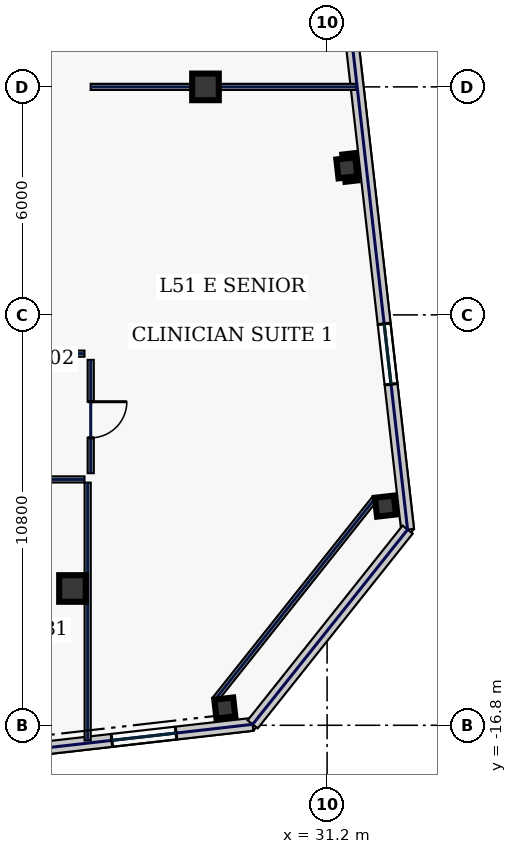
"""IFC4 building model, lengths in metres.
Left out: names, types, materials, properties, quantities, classifications, styles, units other than length and angle.
Written with IfcOpenShell. Run it as: python <this file> out.ifc"""

import sys

from ifc_helpers import new_model, si_unit, direction, frame, frame_2d, origin, origin_2d, place, context, subcontext, project, spatial, rectangle, hollow_rectangle, extrude, element, fill, save


model = new_model("IFC4")
c1 = context("Model", 3, precision=1e-05, world=origin(), true_north=direction((0.0, 1.0)))
c2 = subcontext(c1, "Body", "Model", "MODEL_VIEW")
j1 = project(units=[si_unit("LENGTHUNIT", "METRE"), si_unit("PLANEANGLEUNIT", "RADIAN")], contexts=[c1])
p1 = place(None, origin())
s1 = spatial("IfcSite", under=j1, at=p1, CompositionType="ELEMENT")
p2 = place(p1, origin())
s2 = spatial("IfcBuilding", under=s1, at=p2, CompositionType="ELEMENT")
p3 = place(p2, frame((0.0, 0.0, 222.2)))
s3 = spatial("IfcBuildingStorey", under=s2, at=p3, CompositionType="ELEMENT", Elevation=222.2)
for number, where, z_axis, x_axis in (
    (1, (24.5, -13.2, 0.0), (0.0, 0.0, 1.0), (1.0, 0.0, 0.0)),
    (2, (28.0, 0.0, 0.0), (0.0, 0.0, 1.0), (1.0, 0.0, 0.0)),
):
    element("IfcColumn", number, at=place(p3, frame(where, z_axis=z_axis, x_axis=x_axis)), inside=s3, PredefinedType="COLUMN", context=c2, shape_type="SweptSolid", body=[
        extrude(hollow_rectangle(XDim=0.7, YDim=0.7, WallThickness=0.032, at=origin_2d()), origin(), (0.0, 0.0, 1.0), 3.74),
    ])
for number, where, z_axis, x_axis in (
    (3, (28.509, -16.345, 0.0), (0.0, 0.0, 1.0), (0.994, 0.113, 0.0)),
    (4, (32.734, -11.033, 0.0), (0.0, 0.0, 1.0), (0.994, 0.113, 0.0)),
    (5, (31.72, -2.131, 0.0), (0.0, 0.0, 1.0), (0.994, 0.113, 0.0)),
):
    element("IfcColumn", number, at=place(p3, frame(where, z_axis=z_axis, x_axis=x_axis)), inside=s3, PredefinedType="COLUMN", context=c2, shape_type="SweptSolid", body=[
        extrude(hollow_rectangle(XDim=0.5, YDim=0.5, WallThickness=0.025, at=origin_2d()), origin(), (0.0, 0.0, 1.0), 3.74),
    ])
p4 = place(p3, frame((10.71, -18.886, 0.0), z_axis=(0.0, 0.0, 1.0), x_axis=(0.993572271362, 0.113199565282, 0.0)))
e6 = element("IfcWall", 6, at=p4, inside=s3, PredefinedType="STANDARD", context=c2, shape_type="SweptSolid", body=[
    extrude(rectangle(XDim=18.651, YDim=0.34, at=frame_2d((9.326, 0.0))), origin(), (0.0, 0.0, 1.0), 3.74),
])
p5 = place(p4, frame((3.024, 0.0, 0.88)))
e7 = element("IfcOpeningElement", 7, at=p5, cuts=e6, PredefinedType="OPENING", context=c2, shape_type="SweptSolid", body=[
    extrude(rectangle(XDim=1.7, YDim=1.95, at=frame_2d((0.85, 0.975))), frame((0.0, 0.18, 0.0), z_axis=(0.0, -1.0, 0.0), x_axis=(1.0, 0.0, 0.0)), (0.0, 0.0, 1.0), 0.36),
])
p6 = place(p4, frame((6.773, 0.0, 0.88)))
e8 = element("IfcOpeningElement", 8, at=p6, cuts=e6, PredefinedType="OPENING", context=c2, shape_type="SweptSolid", body=[
    extrude(rectangle(XDim=1.7, YDim=1.95, at=frame_2d((0.85, 0.975))), frame((0.0, 0.18, 0.0), z_axis=(0.0, -1.0, 0.0), x_axis=(1.0, 0.0, 0.0)), (0.0, 0.0, 1.0), 0.36),
])
p7 = place(p4, frame((11.173, 0.0, 0.88)))
e9 = element("IfcOpeningElement", 9, at=p7, cuts=e6, PredefinedType="OPENING", context=c2, shape_type="SweptSolid", body=[
    extrude(rectangle(XDim=1.7, YDim=1.95, at=frame_2d((0.85, 0.975))), frame((0.0, 0.18, 0.0), z_axis=(0.0, -1.0, 0.0), x_axis=(1.0, 0.0, 0.0)), (0.0, 0.0, 1.0), 0.36),
])
p8 = place(p4, frame((14.921, 0.0, 0.88)))
e10 = element("IfcOpeningElement", 10, at=p8, cuts=e6, PredefinedType="OPENING", context=c2, shape_type="SweptSolid", body=[
    extrude(rectangle(XDim=1.7, YDim=1.95, at=frame_2d((0.85, 0.975))), frame((0.0, 0.18, 0.0), z_axis=(0.0, -1.0, 0.0), x_axis=(1.0, 0.0, 0.0)), (0.0, 0.0, 1.0), 0.36),
])
p9 = place(p3, frame((33.318, -11.651, 0.0), z_axis=(0.0, 0.0, 1.0), x_axis=(-0.11320360501, 0.9935718111, 0.0)))
e11 = element("IfcWall", 11, at=p9, inside=s3, PredefinedType="STANDARD", context=c2, shape_type="SweptSolid", body=[
    extrude(rectangle(XDim=37.2, YDim=0.34, at=frame_2d((18.6, 0.0))), origin(), (0.0, 0.0, 1.0), 3.74),
])
p10 = place(p9, frame((3.85, 0.0, 0.58)))
e12 = element("IfcOpeningElement", 12, at=p10, cuts=e11, PredefinedType="OPENING", context=c2, shape_type="SweptSolid", body=[
    extrude(rectangle(XDim=1.6, YDim=2.3, at=frame_2d((0.8, 1.15))), frame((0.0, 0.18, 0.0), z_axis=(0.0, -1.0, 0.0), x_axis=(1.0, 0.0, 0.0)), (0.0, 0.0, 1.0), 0.36),
])
p11 = place(p9, frame((13.15, 0.0, 0.58)))
e13 = element("IfcOpeningElement", 13, at=p11, cuts=e11, PredefinedType="OPENING", context=c2, shape_type="SweptSolid", body=[
    extrude(rectangle(XDim=1.6, YDim=2.3, at=frame_2d((0.8, 1.15))), frame((0.0, 0.18, 0.0), z_axis=(0.0, -1.0, 0.0), x_axis=(1.0, 0.0, 0.0)), (0.0, 0.0, 1.0), 0.36),
])
p12 = place(p9, frame((22.45, 0.0, 0.58)))
e14 = element("IfcOpeningElement", 14, at=p12, cuts=e11, PredefinedType="OPENING", context=c2, shape_type="SweptSolid", body=[
    extrude(rectangle(XDim=1.6, YDim=2.3, at=frame_2d((0.8, 1.15))), frame((0.0, 0.18, 0.0), z_axis=(0.0, -1.0, 0.0), x_axis=(1.0, 0.0, 0.0)), (0.0, 0.0, 1.0), 0.36),
])
p13 = place(p9, frame((31.75, 0.0, 0.58)))
e15 = element("IfcOpeningElement", 15, at=p13, cuts=e11, PredefinedType="OPENING", context=c2, shape_type="SweptSolid", body=[
    extrude(rectangle(XDim=1.6, YDim=2.3, at=frame_2d((0.8, 1.15))), frame((0.0, 0.18, 0.0), z_axis=(0.0, -1.0, 0.0), x_axis=(1.0, 0.0, 0.0)), (0.0, 0.0, 1.0), 0.36),
])
p14 = place(p3, frame((29.242, -16.775, 0.0), z_axis=(0.0, 0.0, 1.0), x_axis=(0.62252823689, 0.78259733853, 0.0)))
e16 = element("IfcWall", 16, at=p14, inside=s3, PredefinedType="STANDARD", context=c2, shape_type="SweptSolid", body=[
    extrude(rectangle(XDim=6.548, YDim=0.34, at=frame_2d((3.274, 0.0))), origin(), (0.0, 0.0, 1.0), 3.74),
])
p15 = place(p3, frame((28.242, -16.134, 0.0), z_axis=(0.0, 0.0, 1.0), x_axis=(0.622521563328, 0.782602647064, 0.0)))
e17 = element("IfcWall", 17, at=p15, inside=s3, PredefinedType="PARTITIONING", context=c2, shape_type="SweptSolid", body=[
    extrude(rectangle(XDim=6.788, YDim=0.16, at=frame_2d((3.394, 0.0))), origin(), (0.0, 0.0, 1.0), 3.74),
])
p16 = place(p3, frame((10.715, -7.02, 0.0), z_axis=(0.0, 0.0, 1.0), x_axis=(1.0, 0.0, 0.0)))
e18 = element("IfcWall", 18, at=p16, inside=s3, PredefinedType="PARTITIONING", context=c2, shape_type="SweptSolid", body=[
    extrude(rectangle(XDim=14.1, YDim=0.16, at=frame_2d((7.05, 0.0))), origin(), (0.0, 0.0, 1.0), 3.74),
])
p17 = place(p3, frame((24.98, -7.185, 0.0), z_axis=(0.0, 0.0, 1.0), x_axis=(0.0, -1.0, 0.0)))
e19 = element("IfcWall", 19, at=p17, inside=s3, PredefinedType="PARTITIONING", context=c2, shape_type="SweptSolid", body=[
    extrude(rectangle(XDim=2.98, YDim=0.16, at=frame_2d((1.49, 0.0))), origin(), (0.0, 0.0, 1.0), 3.74),
])
p18 = place(p17, frame((1.1, 0.0, 0.0)))
e20 = element("IfcOpeningElement", 20, at=p18, cuts=e19, PredefinedType="OPENING", context=c2, shape_type="SweptSolid", body=[
    extrude(rectangle(XDim=0.95, YDim=2.2, at=frame_2d((0.475, 1.1))), frame((0.0, 0.09, 0.0), z_axis=(0.0, -1.0, 0.0), x_axis=(1.0, 0.0, 0.0)), (0.0, 0.0, 1.0), 0.18),
])
p19 = place(p3, frame((24.815, -10.33, 0.0), z_axis=(0.0, 0.0, 1.0), x_axis=(-1.0, 0.0, 0.0)))
e21 = element("IfcWall", 21, at=p19, inside=s3, PredefinedType="PARTITIONING", context=c2, shape_type="SweptSolid", body=[
    extrude(rectangle(XDim=49.63, YDim=0.16, at=frame_2d((24.815, 0.0))), origin(), (0.0, 0.0, 1.0), 3.74),
])
p20 = place(p19, frame((46.631, 0.0, 0.0)))
e22 = element("IfcOpeningElement", 22, at=p20, cuts=e21, PredefinedType="OPENING", context=c2, shape_type="SweptSolid", body=[
    extrude(rectangle(XDim=1.3, YDim=2.2, at=frame_2d((0.65, 1.1))), frame((0.0, 0.09, 0.0), z_axis=(0.0, -1.0, 0.0), x_axis=(1.0, 0.0, 0.0)), (0.0, 0.0, 1.0), 0.18),
])
p21 = place(p19, frame((42.13, 0.0, 0.0)))
e23 = element("IfcOpeningElement", 23, at=p21, cuts=e21, PredefinedType="OPENING", context=c2, shape_type="SweptSolid", body=[
    extrude(rectangle(XDim=0.95, YDim=2.2, at=frame_2d((0.475, 1.1))), frame((0.0, 0.09, 0.0), z_axis=(0.0, -1.0, 0.0), x_axis=(1.0, 0.0, 0.0)), (0.0, 0.0, 1.0), 0.18),
])
p22 = place(p19, frame((33.55, 0.0, 0.0)))
e24 = element("IfcOpeningElement", 24, at=p22, cuts=e21, PredefinedType="OPENING", context=c2, shape_type="SweptSolid", body=[
    extrude(rectangle(XDim=1.15, YDim=2.2, at=frame_2d((0.575, 1.1))), frame((0.0, 0.09, 0.0), z_axis=(0.0, -1.0, 0.0), x_axis=(1.0, 0.0, 0.0)), (0.0, 0.0, 1.0), 0.18),
])
p23 = place(p19, frame((25.89, 0.0, 0.0)))
e25 = element("IfcOpeningElement", 25, at=p23, cuts=e21, PredefinedType="OPENING", context=c2, shape_type="SweptSolid", body=[
    extrude(rectangle(XDim=0.95, YDim=2.2, at=frame_2d((0.475, 1.1))), frame((0.0, 0.09, 0.0), z_axis=(0.0, -1.0, 0.0), x_axis=(1.0, 0.0, 0.0)), (0.0, 0.0, 1.0), 0.18),
])
p24 = place(p19, frame((14.965, 0.0, 0.0)))
e26 = element("IfcOpeningElement", 26, at=p24, cuts=e21, PredefinedType="OPENING", context=c2, shape_type="SweptSolid", body=[
    extrude(rectangle(XDim=0.95, YDim=2.2, at=frame_2d((0.475, 1.1))), frame((0.0, 0.09, 0.0), z_axis=(0.0, -1.0, 0.0), x_axis=(1.0, 0.0, 0.0)), (0.0, 0.0, 1.0), 0.18),
])
p25 = place(p19, frame((6.24, 0.0, 0.0)))
e27 = element("IfcOpeningElement", 27, at=p25, cuts=e21, PredefinedType="OPENING", context=c2, shape_type="SweptSolid", body=[
    extrude(rectangle(XDim=1.05, YDim=2.2, at=frame_2d((0.525, 1.1))), frame((0.0, 0.09, 0.0), z_axis=(0.0, -1.0, 0.0), x_axis=(1.0, 0.0, 0.0)), (0.0, 0.0, 1.0), 0.18),
])
p26 = place(p19, frame((1.869, 0.0, 0.0)))
e28 = element("IfcOpeningElement", 28, at=p26, cuts=e21, PredefinedType="OPENING", context=c2, shape_type="SweptSolid", body=[
    extrude(rectangle(XDim=1.3, YDim=2.2, at=frame_2d((0.65, 1.1))), frame((0.0, 0.09, 0.0), z_axis=(0.0, -1.0, 0.0), x_axis=(1.0, 0.0, 0.0)), (0.0, 0.0, 1.0), 0.18),
])
p27 = place(p3, frame((24.9, -17.199, 0.0), z_axis=(0.0, 0.0, 1.0), x_axis=(0.0, 1.0, 0.0)))
e29 = element("IfcWall", 29, at=p27, inside=s3, PredefinedType="PARTITIONING", context=c2, shape_type="SweptSolid", body=[
    extrude(rectangle(XDim=6.784, YDim=0.16, at=frame_2d((3.392, 0.0))), origin(), (0.0, 0.0, 1.0), 3.74),
])
p28 = place(p3, frame((24.98, 0.0, 0.0), z_axis=(0.0, 0.0, 1.0), x_axis=(1.0, 0.0, 0.0)))
e30 = element("IfcWall", 30, at=p28, inside=s3, PredefinedType="PARTITIONING", context=c2, shape_type="SweptSolid", body=[
    extrude(rectangle(XDim=6.99, YDim=0.16, at=frame_2d((3.495, 0.0))), origin(), (0.0, 0.0, 1.0), 3.74),
])
p29 = place(p8, origin())
e31 = element("IfcWindow", 31, at=p29, inside=s3, PartitioningType="SINGLE_PANEL", PredefinedType="WINDOW", context=c2, shape_type="SweptSolid", body=[
    extrude(rectangle(XDim=1.7, YDim=1.95, at=frame_2d((0.85, 0.975))), frame((0.0, 0.03, 0.0), z_axis=(0.0, -1.0, 0.0), x_axis=(1.0, 0.0, 0.0)), (0.0, 0.0, 1.0), 0.06),
])
fill(e10, e31)
p30 = place(p10, origin())
e32 = element("IfcWindow", 32, at=p30, inside=s3, PartitioningType="SINGLE_PANEL", PredefinedType="WINDOW", context=c2, shape_type="SweptSolid", body=[
    extrude(rectangle(XDim=1.6, YDim=2.3, at=frame_2d((0.8, 1.15))), frame((0.0, 0.03, 0.0), z_axis=(0.0, -1.0, 0.0), x_axis=(1.0, 0.0, 0.0)), (0.0, 0.0, 1.0), 0.06),
])
fill(e12, e32)
p31 = place(p18, origin())
e33 = element("IfcDoor", 33, at=p31, inside=s3, OperationType="SINGLE_SWING_LEFT", PredefinedType="DOOR", context=c2, shape_type="SweptSolid", body=[
    extrude(rectangle(XDim=0.95, YDim=2.2, at=frame_2d((0.475, 1.1))), frame((0.0, 0.025, 0.0), z_axis=(0.0, -1.0, 0.0), x_axis=(1.0, 0.0, 0.0)), (0.0, 0.0, 1.0), 0.05),
])
fill(e20, e33)
save(model, sys.argv[1])
